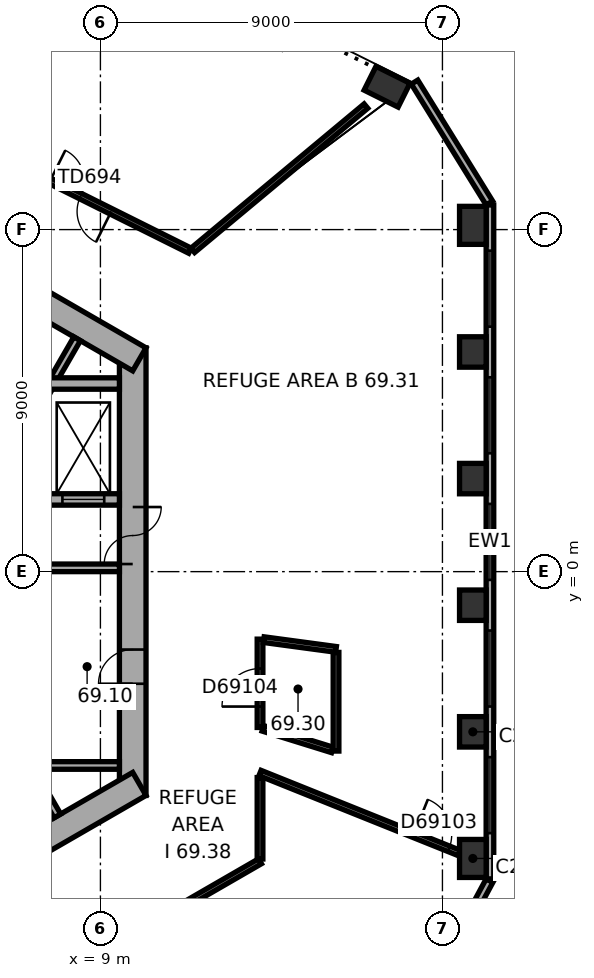
"""IFC4 building model, lengths in metres.
Left out: names, types, materials, properties, quantities, classifications, styles, units other than length and angle.
Written with IfcOpenShell. Run it as: python <this file> out.ifc"""

import sys

from ifc_helpers import new_model, si_unit, direction, frame, frame_2d, origin, origin_2d, place, context, subcontext, project, spatial, rectangle, extrude, element, fill, save


model = new_model("IFC4")
c1 = context("Model", 3, precision=1e-05, world=origin(), true_north=direction((0.0, 1.0)))
c2 = subcontext(c1, "Body", "Model", "MODEL_VIEW")
j1 = project(units=[si_unit("LENGTHUNIT", "METRE"), si_unit("PLANEANGLEUNIT", "RADIAN")], contexts=[c1])
p1 = place(None, origin())
s1 = spatial("IfcSite", under=j1, at=p1, CompositionType="ELEMENT")
p2 = place(p1, origin())
s2 = spatial("IfcBuilding", under=s1, at=p2, CompositionType="ELEMENT")
p3 = place(p2, frame((0.0, 0.0, 278.3)))
s3 = spatial("IfcBuildingStorey", under=s2, at=p3, CompositionType="ELEMENT", Elevation=278.3)
p4 = place(p3, frame((18.8, -7.547, 0.0), z_axis=(0.0, 0.0, 1.0), x_axis=(0.0, 1.0, 0.0)))
e1 = element("IfcColumn", 1, at=p4, inside=s3, PredefinedType="COLUMN", context=c2, shape_type="SweptSolid", body=[
    extrude(rectangle(XDim=1.0, YDim=0.7, at=origin_2d()), origin(), (0.0, 0.0, 1.0), 7.4),
])
for number, where, z_axis, x_axis in (
    (2, (18.8, -4.215, 0.0), (0.0, 0.0, 1.0), (0.0, 1.0, 0.0)),
    (3, (18.8, -0.883, 0.0), (0.0, 0.0, 1.0), (0.0, 1.0, 0.0)),
    (4, (18.8, 2.448, 0.0), (0.0, 0.0, 1.0), (0.0, 1.0, 0.0)),
    (5, (18.8, 5.78, 0.0), (0.0, 0.0, 1.0), (0.0, 1.0, 0.0)),
):
    element("IfcColumn", number, at=place(p3, frame(where, z_axis=z_axis, x_axis=x_axis)), inside=s3, PredefinedType="COLUMN", context=c2, shape_type="SweptSolid", body=[
        extrude(rectangle(XDim=0.8, YDim=0.7, at=origin_2d()), origin(), (0.0, 0.0, 1.0), 7.4),
    ])
for number, where, z_axis, x_axis in (
    (6, (18.8, 9.112, 0.0), (0.0, 0.0, 1.0), (0.0, 1.0, 0.0)),
    (7, (16.543, 12.759, 0.0), (0.0, 0.0, 1.0), (-0.895, 0.446, 0.0)),
):
    element("IfcColumn", number, at=place(p3, frame(where, z_axis=z_axis, x_axis=x_axis)), inside=s3, PredefinedType="COLUMN", context=c2, shape_type="SweptSolid", body=[
        extrude(rectangle(XDim=1.0, YDim=0.7, at=origin_2d()), origin(), (0.0, 0.0, 1.0), 7.4),
    ])
p5 = place(p3, frame((9.85, -5.889, 0.0), z_axis=(0.0, 0.0, 1.0), x_axis=(0.0, 1.0, 0.0)))
e8 = element("IfcWall", 8, at=p5, inside=s3, PredefinedType="SHEAR", context=c2, shape_type="SweptSolid", body=[
    extrude(rectangle(XDim=11.778, YDim=0.7, at=frame_2d((5.889, 0.0))), origin(), (0.0, 0.0, 1.0), 7.4),
])
p6 = place(p5, frame((6.089, 0.0, 0.0)))
e9 = element("IfcOpeningElement", 9, at=p6, cuts=e8, PredefinedType="OPENING", context=c2, shape_type="SweptSolid", body=[
    extrude(rectangle(XDim=1.5, YDim=2.1, at=frame_2d((0.75, 1.05))), frame((0.0, 0.36, 0.0), z_axis=(0.0, -1.0, 0.0), x_axis=(1.0, 0.0, 0.0)), (0.0, 0.0, 1.0), 0.72),
])
p7 = place(p5, frame((2.939, 0.0, 0.0)))
e10 = element("IfcOpeningElement", 10, at=p7, cuts=e8, PredefinedType="OPENING", context=c2, shape_type="SweptSolid", body=[
    extrude(rectangle(XDim=0.9, YDim=2.1, at=frame_2d((0.45, 1.05))), frame((0.0, 0.36, 0.0), z_axis=(0.0, -1.0, 0.0), x_axis=(1.0, 0.0, 0.0)), (0.0, 0.0, 1.0), 0.72),
])
p8 = place(p3, frame((10.025, 5.586, 0.0), z_axis=(0.0, 0.0, 1.0), x_axis=(-0.866026453023, 0.499998182661, 0.0)))
e11 = element("IfcWall", 11, at=p8, inside=s3, PredefinedType="SHEAR", context=c2, shape_type="SweptSolid", body=[
    extrude(rectangle(XDim=11.778, YDim=0.7, at=frame_2d((5.889, 0.0))), origin(), (0.0, 0.0, 1.0), 7.4),
])
p9 = place(p8, frame((5.139, 0.0, 0.0)))
e12 = element("IfcOpeningElement", 12, at=p9, cuts=e11, PredefinedType="OPENING", context=c2, shape_type="SweptSolid", body=[
    extrude(rectangle(XDim=0.9, YDim=2.1, at=frame_2d((0.45, 1.05))), frame((0.0, 0.36, 0.0), z_axis=(0.0, -1.0, 0.0), x_axis=(1.0, 0.0, 0.0)), (0.0, 0.0, 1.0), 0.72),
])
p10 = place(p3, frame((-0.175, -11.475, 0.0), z_axis=(0.0, 0.0, 1.0), x_axis=(0.866026453023, 0.499998182661, 0.0)))
e13 = element("IfcWall", 13, at=p10, inside=s3, PredefinedType="SHEAR", context=c2, shape_type="SweptSolid", body=[
    extrude(rectangle(XDim=11.778, YDim=0.7, at=frame_2d((5.889, 0.0))), origin(), (0.0, 0.0, 1.0), 7.4),
])
p11 = place(p10, frame((2.439, 0.0, 0.0)))
e14 = element("IfcOpeningElement", 14, at=p11, cuts=e13, PredefinedType="OPENING", context=c2, shape_type="SweptSolid", body=[
    extrude(rectangle(XDim=1.1, YDim=2.1, at=frame_2d((0.55, 1.05))), frame((0.0, 0.36, 0.0), z_axis=(0.0, -1.0, 0.0), x_axis=(1.0, 0.0, 0.0)), (0.0, 0.0, 1.0), 0.72),
])
p12 = place(p10, frame((5.039, 0.0, 0.0)))
e15 = element("IfcOpeningElement", 15, at=p12, cuts=e13, PredefinedType="OPENING", context=c2, shape_type="SweptSolid", body=[
    extrude(rectangle(XDim=1.1, YDim=2.1, at=frame_2d((0.55, 1.05))), frame((0.0, 0.36, 0.0), z_axis=(0.0, -1.0, 0.0), x_axis=(1.0, 0.0, 0.0)), (0.0, 0.0, 1.0), 0.72),
])
p13 = place(p10, frame((7.639, 0.0, 0.0)))
e16 = element("IfcOpeningElement", 16, at=p13, cuts=e13, PredefinedType="OPENING", context=c2, shape_type="SweptSolid", body=[
    extrude(rectangle(XDim=1.1, YDim=2.1, at=frame_2d((0.55, 1.05))), frame((0.0, 0.36, 0.0), z_axis=(0.0, -1.0, 0.0), x_axis=(1.0, 0.0, 0.0)), (0.0, 0.0, 1.0), 0.72),
])
p14 = place(p3, frame((19.25, -8.084, 0.0), z_axis=(0.0, 0.0, 1.0), x_axis=(0.0, 1.0, 0.0)))
e17 = element("IfcWall", 17, at=p14, inside=s3, PredefinedType="STANDARD", context=c2, shape_type="SweptSolid", body=[
    extrude(rectangle(XDim=17.731, YDim=0.2, at=frame_2d((8.866, 0.0))), origin(), (0.0, 0.0, 1.0), 7.4),
])
p15 = place(p14, frame((1.203, 0.0, 0.8)))
e18 = element("IfcOpeningElement", 18, at=p15, cuts=e17, PredefinedType="OPENING", context=c2, shape_type="SweptSolid", body=[
    extrude(rectangle(XDim=2.0, YDim=4.2, at=frame_2d((1.0, 2.1))), frame((0.0, 0.11, 0.0), z_axis=(0.0, -1.0, 0.0), x_axis=(1.0, 0.0, 0.0)), (0.0, 0.0, 1.0), 0.22),
])
p16 = place(p14, frame((4.535, 0.0, 0.8)))
e19 = element("IfcOpeningElement", 19, at=p16, cuts=e17, PredefinedType="OPENING", context=c2, shape_type="SweptSolid", body=[
    extrude(rectangle(XDim=2.0, YDim=4.2, at=frame_2d((1.0, 2.1))), frame((0.0, 0.11, 0.0), z_axis=(0.0, -1.0, 0.0), x_axis=(1.0, 0.0, 0.0)), (0.0, 0.0, 1.0), 0.22),
])
p17 = place(p14, frame((7.866, 0.0, 0.8)))
e20 = element("IfcOpeningElement", 20, at=p17, cuts=e17, PredefinedType="OPENING", context=c2, shape_type="SweptSolid", body=[
    extrude(rectangle(XDim=2.0, YDim=4.2, at=frame_2d((1.0, 2.1))), frame((0.0, 0.11, 0.0), z_axis=(0.0, -1.0, 0.0), x_axis=(1.0, 0.0, 0.0)), (0.0, 0.0, 1.0), 0.22),
])
p18 = place(p14, frame((11.198, 0.0, 0.8)))
e21 = element("IfcOpeningElement", 21, at=p18, cuts=e17, PredefinedType="OPENING", context=c2, shape_type="SweptSolid", body=[
    extrude(rectangle(XDim=2.0, YDim=4.2, at=frame_2d((1.0, 2.1))), frame((0.0, 0.11, 0.0), z_axis=(0.0, -1.0, 0.0), x_axis=(1.0, 0.0, 0.0)), (0.0, 0.0, 1.0), 0.22),
])
p19 = place(p14, frame((14.53, 0.0, 0.8)))
e22 = element("IfcOpeningElement", 22, at=p19, cuts=e17, PredefinedType="OPENING", context=c2, shape_type="SweptSolid", body=[
    extrude(rectangle(XDim=2.0, YDim=4.2, at=frame_2d((1.0, 2.1))), frame((0.0, 0.11, 0.0), z_axis=(0.0, -1.0, 0.0), x_axis=(1.0, 0.0, 0.0)), (0.0, 0.0, 1.0), 0.22),
])
p20 = place(p3, frame((19.235, 9.7, 0.0), z_axis=(0.0, 0.0, 1.0), x_axis=(-0.526204076801, 0.850358318333, 0.0)))
e23 = element("IfcWall", 23, at=p20, inside=s3, PredefinedType="STANDARD", context=c2, shape_type="SweptSolid", body=[
    extrude(rectangle(XDim=3.741, YDim=0.2, at=frame_2d((1.871, 0.0))), origin(), (0.0, 0.0, 1.0), 7.4),
])
p21 = place(p3, frame((17.399, -11.554, 0.0), z_axis=(0.0, 0.0, 1.0), x_axis=(0.473309051311, 0.880896442238, 0.0)))
e24 = element("IfcWall", 24, at=p21, inside=s3, PredefinedType="STANDARD", context=c2, shape_type="SweptSolid", body=[
    extrude(rectangle(XDim=3.886, YDim=0.2, at=frame_2d((1.943, 0.0))), origin(), (0.0, 0.0, 1.0), 7.4),
])
p22 = place(p21, frame((0.643, 0.0, 0.8)))
e25 = element("IfcOpeningElement", 25, at=p22, cuts=e24, PredefinedType="OPENING", context=c2, shape_type="SweptSolid", body=[
    extrude(rectangle(XDim=2.6, YDim=4.2, at=frame_2d((1.3, 2.1))), frame((0.0, 0.11, 0.0), z_axis=(0.0, -1.0, 0.0), x_axis=(1.0, 0.0, 0.0)), (0.0, 0.0, 1.0), 0.22),
])
p23 = place(p3, frame((-0.149, 14.181, 0.0), z_axis=(0.0, 0.0, 1.0), x_axis=(0.894939310063, -0.446187887894, 0.0)))
e26 = element("IfcWall", 26, at=p23, inside=s3, PredefinedType="STANDARD", context=c2, shape_type="SweptSolid", body=[
    extrude(rectangle(XDim=12.857, YDim=0.15, at=frame_2d((6.428, 0.0))), origin(), (0.0, 0.0, 1.0), 2.6),
])
p24 = place(p23, frame((2.314, 0.0, 0.0)))
e27 = element("IfcOpeningElement", 27, at=p24, cuts=e26, PredefinedType="OPENING", context=c2, shape_type="SweptSolid", body=[
    extrude(rectangle(XDim=1.8, YDim=2.4, at=frame_2d((0.9, 1.2))), frame((0.0, 0.085, 0.0), z_axis=(0.0, -1.0, 0.0), x_axis=(1.0, 0.0, 0.0)), (0.0, 0.0, 1.0), 0.17),
])
p25 = place(p23, frame((8.743, 0.0, 0.0)))
e28 = element("IfcOpeningElement", 28, at=p25, cuts=e26, PredefinedType="OPENING", context=c2, shape_type="SweptSolid", body=[
    extrude(rectangle(XDim=1.8, YDim=2.4, at=frame_2d((0.9, 1.2))), frame((0.0, 0.085, 0.0), z_axis=(0.0, -1.0, 0.0), x_axis=(1.0, 0.0, 0.0)), (0.0, 0.0, 1.0), 0.17),
])
p26 = place(p3, frame((11.431, 8.454, 0.0), z_axis=(0.0, 0.0, 1.0), x_axis=(0.768295513577, 0.640095308386, 0.0)))
e29 = element("IfcWall", 29, at=p26, inside=s3, PredefinedType="STANDARD", context=c2, shape_type="SweptSolid", body=[
    extrude(rectangle(XDim=5.93, YDim=0.15, at=frame_2d((2.965, 0.0))), origin(), (0.0, 0.0, 1.0), 2.6),
])
for number, where, z_axis, x_axis in (
    (30, (7.3, -5.1, 0.0), (0.0, 0.0, 1.0), (1.0, 0.0, 0.0)),
    (31, (7.3, 0.1, 0.0), (0.0, 0.0, 1.0), (1.0, 0.0, 0.0)),
    (32, (7.287, 4.222, 0.0), (0.0, 0.0, 1.0), (0.5, 0.866, 0.0)),
    (33, (6.768, -4.522, 0.0), (0.0, 0.0, 1.0), (0.5, -0.866, 0.0)),
):
    element("IfcWall", number, at=place(p3, frame(where, z_axis=z_axis, x_axis=x_axis)), inside=s3, PredefinedType="PARTITIONING", context=c2, shape_type="SweptSolid", body=[
        extrude(rectangle(XDim=2.2, YDim=0.2, at=frame_2d((1.1, 0.0))), origin(), (0.0, 0.0, 1.0), 7.12),
    ])
p27 = place(p3, frame((7.3, 1.9, 0.0), z_axis=(0.0, 0.0, 1.0), x_axis=(1.0, 0.0, 0.0)))
e34 = element("IfcWall", 34, at=p27, inside=s3, PredefinedType="SHEAR", context=c2, shape_type="SweptSolid", body=[
    extrude(rectangle(XDim=2.2, YDim=0.3, at=frame_2d((1.1, 0.0))), origin(), (0.0, 0.0, 1.0), 7.12),
])
p28 = place(p27, frame((0.7, 0.0, 0.0)))
e35 = element("IfcOpeningElement", 35, at=p28, cuts=e34, PredefinedType="OPENING", context=c2, shape_type="SweptSolid", body=[
    extrude(rectangle(XDim=1.1, YDim=2.1, at=frame_2d((0.55, 1.05))), frame((0.0, 0.16, 0.0), z_axis=(0.0, -1.0, 0.0), x_axis=(1.0, 0.0, 0.0)), (0.0, 0.0, 1.0), 0.32),
])
p29 = place(p3, frame((7.3, 4.95, 0.0), z_axis=(0.0, 0.0, 1.0), x_axis=(1.0, 0.0, 0.0)))
e36 = element("IfcWall", 36, at=p29, inside=s3, PredefinedType="SHEAR", context=c2, shape_type="SweptSolid", body=[
    extrude(rectangle(XDim=2.2, YDim=0.3, at=frame_2d((1.1, 0.0))), origin(), (0.0, 0.0, 1.0), 7.12),
])
p30 = place(p3, frame((11.127, -8.817, 0.0), z_axis=(0.0, 0.0, 1.0), x_axis=(0.866075162418, 0.499913805613, 0.0)))
e37 = element("IfcWall", 37, at=p30, inside=s3, PredefinedType="PARTITIONING", context=c2, shape_type="SweptSolid", body=[
    extrude(rectangle(XDim=2.393, YDim=0.15, at=frame_2d((1.197, 0.0))), origin(), (0.0, 0.0, 1.0), 7.12),
])
p31 = place(p3, frame((13.2, -7.561, 0.0), z_axis=(0.0, 0.0, 1.0), x_axis=(0.0, 1.0, 0.0)))
e38 = element("IfcWall", 38, at=p31, inside=s3, PredefinedType="PARTITIONING", context=c2, shape_type="SweptSolid", body=[
    extrude(rectangle(XDim=2.143, YDim=0.15, at=frame_2d((1.071, 0.0))), origin(), (0.0, 0.0, 1.0), 7.12),
])
p32 = place(p3, frame((13.2, -5.299, 0.0), z_axis=(0.0, 0.0, 1.0), x_axis=(0.928023609597, -0.372521381977, 0.0)))
e39 = element("IfcWall", 39, at=p32, inside=s3, PredefinedType="PARTITIONING", context=c2, shape_type="SweptSolid", body=[
    extrude(rectangle(XDim=5.657, YDim=0.15, at=frame_2d((2.829, 0.0))), origin(), (0.0, 0.0, 1.0), 6.57),
])
p33 = place(p32, frame((4.357, 0.0, 0.0)))
e40 = element("IfcOpeningElement", 40, at=p33, cuts=e39, PredefinedType="OPENING", context=c2, shape_type="SweptSolid", body=[
    extrude(rectangle(XDim=1.0, YDim=2.1, at=frame_2d((0.5, 1.05))), frame((0.0, 0.085, 0.0), z_axis=(0.0, -1.0, 0.0), x_axis=(1.0, 0.0, 0.0)), (0.0, 0.0, 1.0), 0.17),
])
p34 = place(p3, frame((15.104, -4.691, 0.0), z_axis=(0.0, 0.0, 1.0), x_axis=(-0.955023043559, 0.296531594054, 0.0)))
e41 = element("IfcWall", 41, at=p34, inside=s3, PredefinedType="PARTITIONING", context=c2, shape_type="SweptSolid", body=[
    extrude(rectangle(XDim=1.914, YDim=0.15, at=frame_2d((0.957, 0.0))), origin(), (0.0, 0.0, 1.0), 7.12),
])
p35 = place(p3, frame((13.2, -4.1, 0.0), z_axis=(0.0, 0.0, 1.0), x_axis=(0.0, 1.0, 0.0)))
e42 = element("IfcWall", 42, at=p35, inside=s3, PredefinedType="PARTITIONING", context=c2, shape_type="SweptSolid", body=[
    extrude(rectangle(XDim=2.324, YDim=0.15, at=frame_2d((1.162, 0.0))), origin(), (0.0, 0.0, 1.0), 7.12),
])
p36 = place(p35, frame((0.55, 0.0, 0.0)))
e43 = element("IfcOpeningElement", 43, at=p36, cuts=e42, PredefinedType="OPENING", context=c2, shape_type="SweptSolid", body=[
    extrude(rectangle(XDim=1.0, YDim=2.1, at=frame_2d((0.5, 1.05))), frame((0.0, 0.085, 0.0), z_axis=(0.0, -1.0, 0.0), x_axis=(1.0, 0.0, 0.0)), (0.0, 0.0, 1.0), 0.17),
])
p37 = place(p3, frame((15.2, -2.125, 0.0), z_axis=(0.0, 0.0, 1.0), x_axis=(0.0, -1.0, 0.0)))
e44 = element("IfcWall", 44, at=p37, inside=s3, PredefinedType="PARTITIONING", context=c2, shape_type="SweptSolid", body=[
    extrude(rectangle(XDim=2.595, YDim=0.15, at=frame_2d((1.298, 0.0))), origin(), (0.0, 0.0, 1.0), 7.12),
])
p38 = place(p3, frame((13.299, -1.789, 0.0), z_axis=(0.0, 0.0, 1.0), x_axis=(0.991045767705, -0.133522606001, 0.0)))
e45 = element("IfcWall", 45, at=p38, inside=s3, PredefinedType="PARTITIONING", context=c2, shape_type="SweptSolid", body=[
    extrude(rectangle(XDim=1.918, YDim=0.15, at=frame_2d((0.959, 0.0))), origin(), (0.0, 0.0, 1.0), 7.12),
])
p39 = place(p15, origin())
e46 = element("IfcWindow", 46, at=p39, inside=s3, PartitioningType="SINGLE_PANEL", PredefinedType="WINDOW", context=c2, shape_type="SweptSolid", body=[
    extrude(rectangle(XDim=2.0, YDim=4.2, at=frame_2d((1.0, 2.1))), frame((0.0, 0.03, 0.0), z_axis=(0.0, -1.0, 0.0), x_axis=(1.0, 0.0, 0.0)), (0.0, 0.0, 1.0), 0.06),
])
fill(e18, e46)
p40 = place(p16, origin())
e47 = element("IfcWindow", 47, at=p40, inside=s3, PartitioningType="SINGLE_PANEL", PredefinedType="WINDOW", context=c2, shape_type="SweptSolid", body=[
    extrude(rectangle(XDim=2.0, YDim=4.2, at=frame_2d((1.0, 2.1))), frame((0.0, 0.03, 0.0), z_axis=(0.0, -1.0, 0.0), x_axis=(1.0, 0.0, 0.0)), (0.0, 0.0, 1.0), 0.06),
])
fill(e19, e47)
p41 = place(p17, origin())
e48 = element("IfcWindow", 48, at=p41, inside=s3, PartitioningType="SINGLE_PANEL", PredefinedType="WINDOW", context=c2, shape_type="SweptSolid", body=[
    extrude(rectangle(XDim=2.0, YDim=4.2, at=frame_2d((1.0, 2.1))), frame((0.0, 0.03, 0.0), z_axis=(0.0, -1.0, 0.0), x_axis=(1.0, 0.0, 0.0)), (0.0, 0.0, 1.0), 0.06),
])
fill(e20, e48)
p42 = place(p18, origin())
e49 = element("IfcWindow", 49, at=p42, inside=s3, PartitioningType="SINGLE_PANEL", PredefinedType="WINDOW", context=c2, shape_type="SweptSolid", body=[
    extrude(rectangle(XDim=2.0, YDim=4.2, at=frame_2d((1.0, 2.1))), frame((0.0, 0.03, 0.0), z_axis=(0.0, -1.0, 0.0), x_axis=(1.0, 0.0, 0.0)), (0.0, 0.0, 1.0), 0.06),
])
fill(e21, e49)
p43 = place(p19, origin())
e50 = element("IfcWindow", 50, at=p43, inside=s3, PartitioningType="SINGLE_PANEL", PredefinedType="WINDOW", context=c2, shape_type="SweptSolid", body=[
    extrude(rectangle(XDim=2.0, YDim=4.2, at=frame_2d((1.0, 2.1))), frame((0.0, 0.03, 0.0), z_axis=(0.0, -1.0, 0.0), x_axis=(1.0, 0.0, 0.0)), (0.0, 0.0, 1.0), 0.06),
])
fill(e22, e50)
p44 = place(p25, origin())
e51 = element("IfcDoor", 51, at=p44, inside=s3, OperationType="DOUBLE_DOOR_DOUBLE_SWING", PredefinedType="DOOR", context=c2, shape_type="SweptSolid", body=[
    extrude(rectangle(XDim=1.8, YDim=2.4, at=frame_2d((0.9, 1.2))), frame((0.0, 0.025, 0.0), z_axis=(0.0, -1.0, 0.0), x_axis=(1.0, 0.0, 0.0)), (0.0, 0.0, 1.0), 0.05),
])
fill(e28, e51)
p45 = place(p6, origin())
e52 = element("IfcDoor", 52, at=p45, inside=s3, OperationType="DOUBLE_DOOR_SINGLE_SWING", PredefinedType="DOOR", context=c2, shape_type="SweptSolid", body=[
    extrude(rectangle(XDim=1.5, YDim=2.1, at=frame_2d((0.75, 1.05))), frame((0.0, 0.025, 0.0), z_axis=(0.0, -1.0, 0.0), x_axis=(1.0, 0.0, 0.0)), (0.0, 0.0, 1.0), 0.05),
])
fill(e9, e52)
p46 = place(p7, origin())
e53 = element("IfcDoor", 53, at=p46, inside=s3, OperationType="SINGLE_SWING_LEFT", PredefinedType="DOOR", context=c2, shape_type="SweptSolid", body=[
    extrude(rectangle(XDim=0.9, YDim=2.1, at=frame_2d((0.45, 1.05))), frame((0.0, 0.025, 0.0), z_axis=(0.0, -1.0, 0.0), x_axis=(1.0, 0.0, 0.0)), (0.0, 0.0, 1.0), 0.05),
])
fill(e10, e53)
p47 = place(p28, origin())
e54 = element("IfcDoor", 54, at=p47, inside=s3, OperationType="DOUBLE_DOOR_SLIDING", PredefinedType="DOOR", context=c2, shape_type="SweptSolid", body=[
    extrude(rectangle(XDim=1.1, YDim=2.1, at=frame_2d((0.55, 1.05))), frame((0.0, 0.025, 0.0), z_axis=(0.0, -1.0, 0.0), x_axis=(1.0, 0.0, 0.0)), (0.0, 0.0, 1.0), 0.05),
])
fill(e35, e54)
p48 = place(p33, origin())
e55 = element("IfcDoor", 55, at=p48, inside=s3, OperationType="SINGLE_SWING_LEFT", PredefinedType="DOOR", context=c2, shape_type="SweptSolid", body=[
    extrude(rectangle(XDim=1.0, YDim=2.1, at=frame_2d((0.5, 1.05))), frame((0.0, 0.025, 0.0), z_axis=(0.0, -1.0, 0.0), x_axis=(1.0, 0.0, 0.0)), (0.0, 0.0, 1.0), 0.05),
])
fill(e40, e55)
p49 = place(p36, origin())
e56 = element("IfcDoor", 56, at=p49, inside=s3, OperationType="SINGLE_SWING_LEFT", PredefinedType="DOOR", context=c2, shape_type="SweptSolid", body=[
    extrude(rectangle(XDim=1.0, YDim=2.1, at=frame_2d((0.5, 1.05))), frame((0.0, 0.025, 0.0), z_axis=(0.0, -1.0, 0.0), x_axis=(1.0, 0.0, 0.0)), (0.0, 0.0, 1.0), 0.05),
])
fill(e43, e56)
save(model, sys.argv[1])
